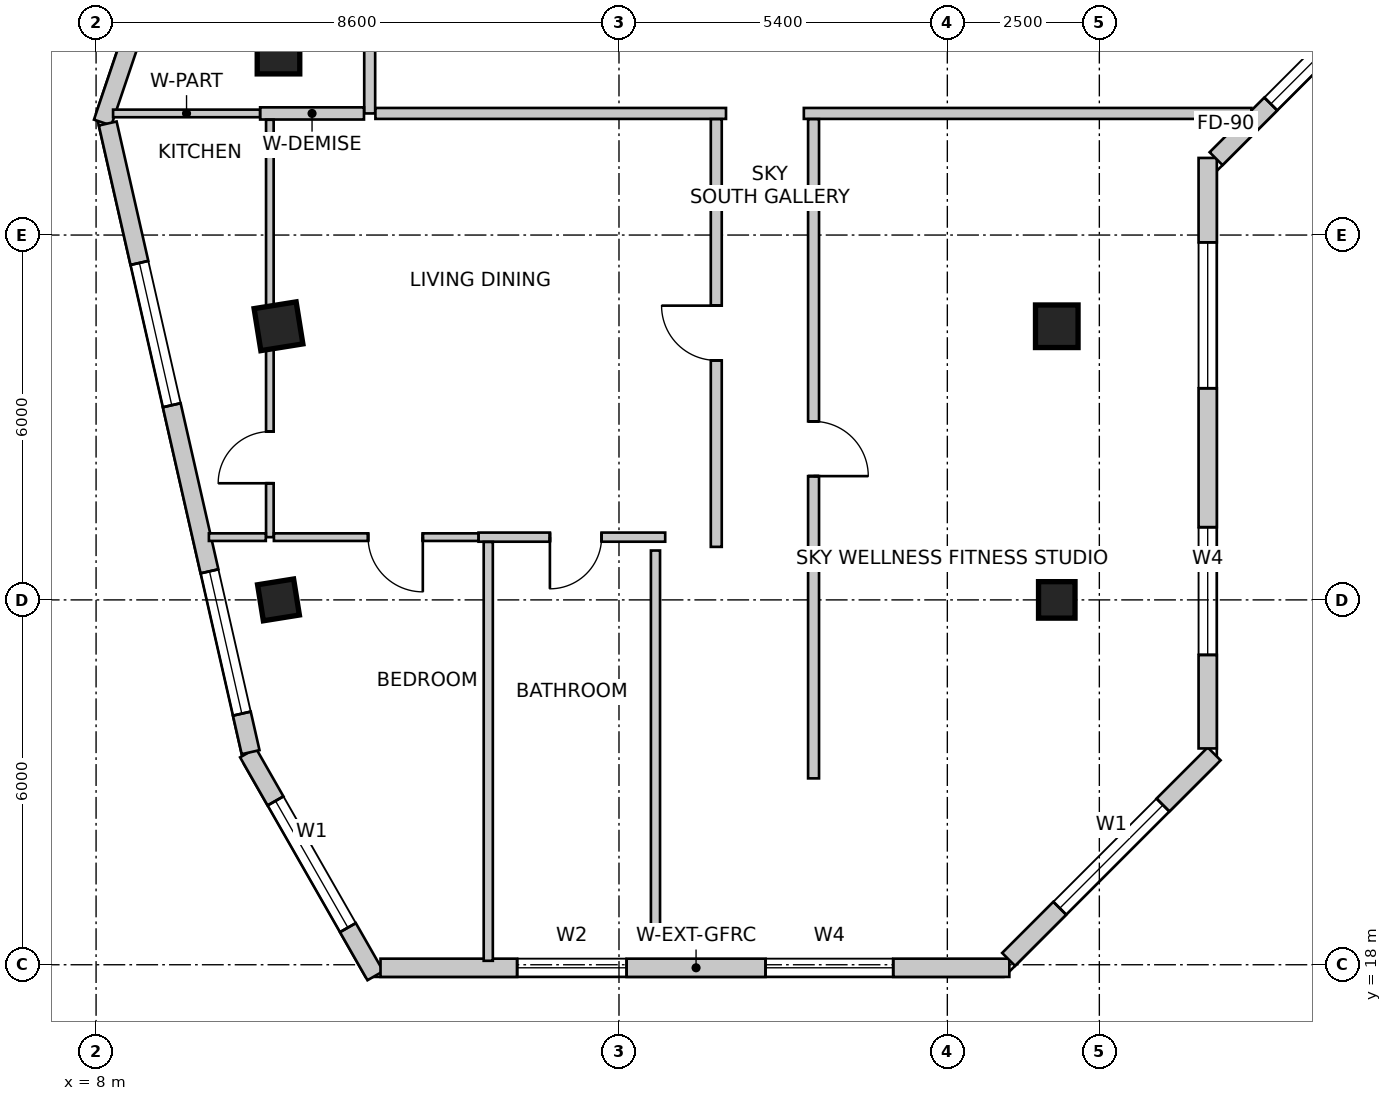
"""IFC4 building model, lengths in metres.
Left out: names, types, materials, properties, quantities, classifications, styles, units other than length and angle.
Written with IfcOpenShell. Run it as: python <this file> out.ifc"""

import sys

from ifc_helpers import new_model, si_unit, direction, frame, frame_2d, origin, origin_2d, place, context, subcontext, project, spatial, rectangle, extrude, source, transform, mapped, element, fill, save


model = new_model("IFC4")
c1 = context("Model", 3, precision=1e-05, world=origin(), true_north=direction((0.0, 1.0)))
c2 = subcontext(c1, "Body", "Model", "MODEL_VIEW")
j1 = project(units=[si_unit("LENGTHUNIT", "METRE"), si_unit("PLANEANGLEUNIT", "RADIAN")], contexts=[c1])
p1 = place(None, origin())
s1 = spatial("IfcSite", under=j1, at=p1, CompositionType="ELEMENT")
p2 = place(p1, origin())
s2 = spatial("IfcBuilding", under=s1, at=p2, CompositionType="ELEMENT")
p3 = place(p2, frame((0.0, 0.0, 263.7)))
s3 = spatial("IfcBuildingStorey", under=s2, at=p3, CompositionType="ELEMENT", Elevation=263.7)
m1 = source(origin(), c2, "Body", "SweptSolid", [
    extrude(rectangle(XDim=0.7, YDim=0.7, at=origin_2d()), origin(), (0.0, 0.0, 1.0), 3.6),
])
for number, where, z_axis, x_axis in (
    (1, (11.0, 33.0, 0.0), (0.0, 0.0, 1.0), (1.0, 0.0, 0.0)),
    (2, (11.0, 28.5, 0.0), (0.0, 0.0, 1.0), (0.158, -0.987, 0.0)),
):
    element("IfcColumn", number, at=place(p3, frame(where, z_axis=z_axis, x_axis=x_axis)), inside=s3, PredefinedType="COLUMN", context=c2, shape_type="MappedRepresentation", body=[
        mapped(m1, transform((0.0, 0.0, 0.0), scale=1.0)),
    ])
m2 = source(origin(), c2, "Body", "SweptSolid", [
    extrude(rectangle(XDim=0.6, YDim=0.6, at=origin_2d()), origin(), (0.0, 0.0, 1.0), 3.6),
])
p4 = place(p3, frame((11.0, 24.0, 0.0), z_axis=(0.0, 0.0, 1.0), x_axis=(0.158158067254, -0.987413806751, 0.0)))
e3 = element("IfcColumn", 3, at=p4, inside=s3, PredefinedType="COLUMN", context=c2, shape_type="MappedRepresentation", body=[
    mapped(m2, transform((0.0, 0.0, 0.0), scale=1.0)),
])
p5 = place(p3, frame((23.8, 28.5, 0.0), z_axis=(0.0, 0.0, 1.0), x_axis=(1.0, 0.0, 0.0)))
e4 = element("IfcColumn", 4, at=p5, inside=s3, PredefinedType="COLUMN", context=c2, shape_type="MappedRepresentation", body=[
    mapped(m1, transform((0.0, 0.0, 0.0), scale=1.0)),
])
p6 = place(p3, frame((23.8, 24.0, 0.0), z_axis=(0.0, 0.0, 1.0), x_axis=(1.0, 0.0, 0.0)))
e5 = element("IfcColumn", 5, at=p6, inside=s3, PredefinedType="COLUMN", context=c2, shape_type="MappedRepresentation", body=[
    mapped(m2, transform((0.0, 0.0, 0.0), scale=1.0)),
])
p7 = place(p3, frame((10.499, 21.485, 0.0), z_axis=(0.0, 0.0, 1.0), x_axis=(0.496163848656, -0.868228907194, 0.0)))
e6 = element("IfcWall", 6, at=p7, inside=s3, PredefinedType="SOLIDWALL", context=c2, shape_type="SweptSolid", body=[
    extrude(rectangle(XDim=4.222, YDim=0.3, at=frame_2d((2.111, 0.0))), origin(), (0.0, 0.0, 1.0), 3.35),
])
m3 = source(origin(), c2, "Body", "SweptSolid", [
    extrude(rectangle(XDim=2.4, YDim=2.2, at=frame_2d((1.2, 1.1))), frame((0.0, 0.16, 0.0), z_axis=(0.0, -1.0, 0.0), x_axis=(1.0, 0.0, 0.0)), (0.0, 0.0, 1.0), 0.32),
])
p8 = place(p7, frame((0.911, 0.0, 0.85)))
e7 = element("IfcOpeningElement", 7, at=p8, cuts=e6, PredefinedType="OPENING", context=c2, shape_type="MappedRepresentation", body=[
    mapped(m3, transform((0.0, 0.0, 0.0), scale=1.0)),
])
p9 = place(p3, frame((12.678, 17.95, 0.0), z_axis=(0.0, 0.0, 1.0), x_axis=(1.0, 0.0, 0.0)))
e8 = element("IfcWall", 8, at=p9, inside=s3, PredefinedType="SOLIDWALL", context=c2, shape_type="SweptSolid", body=[
    extrude(rectangle(XDim=10.342, YDim=0.3, at=frame_2d((5.171, 0.0))), origin(), (0.0, 0.0, 1.0), 3.35),
])
m4 = source(origin(), c2, "Body", "SweptSolid", [
    extrude(rectangle(XDim=1.8, YDim=2.1, at=frame_2d((0.9, 1.05))), frame((0.0, 0.16, 0.0), z_axis=(0.0, -1.0, 0.0), x_axis=(1.0, 0.0, 0.0)), (0.0, 0.0, 1.0), 0.32),
])
p10 = place(p9, frame((2.247, 0.0, 0.85)))
e9 = element("IfcOpeningElement", 9, at=p10, cuts=e8, PredefinedType="OPENING", context=c2, shape_type="MappedRepresentation", body=[
    mapped(m4, transform((0.0, 0.0, 0.0), scale=1.0)),
])
m5 = source(origin(), c2, "Body", "SweptSolid", [
    extrude(rectangle(XDim=2.1, YDim=2.0, at=frame_2d((1.05, 1.0))), frame((0.0, 0.16, 0.0), z_axis=(0.0, -1.0, 0.0), x_axis=(1.0, 0.0, 0.0)), (0.0, 0.0, 1.0), 0.32),
])
p11 = place(p9, frame((6.332, 0.0, 0.85)))
e10 = element("IfcOpeningElement", 10, at=p11, cuts=e8, PredefinedType="OPENING", context=c2, shape_type="MappedRepresentation", body=[
    mapped(m5, transform((0.0, 0.0, 0.0), scale=1.0)),
])
p12 = place(p3, frame((23.008, 18.088, 0.0), z_axis=(0.0, 0.0, 1.0), x_axis=(0.707106781187, 0.707106781187, 0.0)))
e11 = element("IfcWall", 11, at=p12, inside=s3, PredefinedType="SOLIDWALL", context=c2, shape_type="SweptSolid", body=[
    extrude(rectangle(XDim=4.781, YDim=0.3, at=frame_2d((2.39, 0.0))), origin(), (0.0, 0.0, 1.0), 3.35),
])
p13 = place(p12, frame((1.19, 0.0, 0.85)))
e12 = element("IfcOpeningElement", 12, at=p13, cuts=e11, PredefinedType="OPENING", context=c2, shape_type="MappedRepresentation", body=[
    mapped(m3, transform((0.0, 0.0, 0.0), scale=1.0)),
])
p14 = place(p3, frame((26.282, 21.557, 0.0), z_axis=(0.0, 0.0, 1.0), x_axis=(0.0, 1.0, 0.0)))
e13 = element("IfcWall", 13, at=p14, inside=s3, PredefinedType="SOLIDWALL", context=c2, shape_type="SweptSolid", body=[
    extrude(rectangle(XDim=9.711, YDim=0.3, at=frame_2d((4.855, 0.0))), origin(), (0.0, 0.0, 1.0), 3.35),
])
p15 = place(p14, frame((1.538, 0.0, 0.85)))
e14 = element("IfcOpeningElement", 14, at=p15, cuts=e13, PredefinedType="OPENING", context=c2, shape_type="MappedRepresentation", body=[
    mapped(m5, transform((0.0, 0.0, 0.0), scale=1.0)),
])
p16 = place(p14, frame((5.923, 0.0, 0.85)))
e15 = element("IfcOpeningElement", 15, at=p16, cuts=e13, PredefinedType="OPENING", context=c2, shape_type="MappedRepresentation", body=[
    mapped(m3, transform((0.0, 0.0, 0.0), scale=1.0)),
])
p17 = place(p3, frame((26.42, 31.256, 0.0), z_axis=(0.0, 0.0, 1.0), x_axis=(0.707106781187, 0.707106781187, 0.0)))
e16 = element("IfcWall", 16, at=p17, inside=s3, PredefinedType="SOLIDWALL", context=c2, shape_type="SweptSolid", body=[
    extrude(rectangle(XDim=2.907, YDim=0.3, at=frame_2d((1.454, 0.0))), origin(), (0.0, 0.0, 1.0), 3.35),
])
m6 = source(origin(), c2, "Body", "SweptSolid", [
    extrude(rectangle(XDim=1.2, YDim=1.6, at=frame_2d((0.6, 0.8))), frame((0.0, 0.16, 0.0), z_axis=(0.0, -1.0, 0.0), x_axis=(1.0, 0.0, 0.0)), (0.0, 0.0, 1.0), 0.32),
])
p18 = place(p17, frame((1.272, 0.0, 0.85)))
e17 = element("IfcOpeningElement", 17, at=p18, cuts=e16, PredefinedType="OPENING", context=c2, shape_type="MappedRepresentation", body=[
    mapped(m6, transform((0.0, 0.0, 0.0), scale=1.0)),
])
p19 = place(p3, frame((13.269, 47.134, 0.0), z_axis=(0.0, 0.0, 1.0), x_axis=(-0.3199211297, -0.947444178182, 0.0)))
e18 = element("IfcWall", 18, at=p19, inside=s3, PredefinedType="SOLIDWALL", context=c2, shape_type="SweptSolid", body=[
    extrude(rectangle(XDim=16.132, YDim=0.3, at=frame_2d((8.066, 0.0))), origin(), (0.0, 0.0, 1.0), 3.35),
])
p20 = place(p19, frame((2.585, 0.0, 0.85)))
e19 = element("IfcOpeningElement", 19, at=p20, cuts=e18, PredefinedType="OPENING", context=c2, shape_type="MappedRepresentation", body=[
    mapped(m5, transform((0.0, 0.0, 0.0), scale=1.0)),
])
p21 = place(p19, frame((7.267, 0.0, 0.85)))
e20 = element("IfcOpeningElement", 20, at=p21, cuts=e18, PredefinedType="OPENING", context=c2, shape_type="MappedRepresentation", body=[
    mapped(m3, transform((0.0, 0.0, 0.0), scale=1.0)),
])
p22 = place(p19, frame((12.249, 0.0, 0.85)))
e21 = element("IfcOpeningElement", 21, at=p22, cuts=e18, PredefinedType="OPENING", context=c2, shape_type="MappedRepresentation", body=[
    mapped(m5, transform((0.0, 0.0, 0.0), scale=1.0)),
])
p23 = place(p3, frame((8.191, 31.834, 0.0), z_axis=(0.0, 0.0, 1.0), x_axis=(0.221636032737, -0.975129462683, 0.0)))
e22 = element("IfcWall", 22, at=p23, inside=s3, PredefinedType="SOLIDWALL", context=c2, shape_type="SweptSolid", body=[
    extrude(rectangle(XDim=10.602, YDim=0.3, at=frame_2d((5.301, 0.0))), origin(), (0.0, 0.0, 1.0), 3.35),
])
p24 = place(p23, frame((2.351, 0.0, 0.85)))
e23 = element("IfcOpeningElement", 23, at=p24, cuts=e22, PredefinedType="OPENING", context=c2, shape_type="MappedRepresentation", body=[
    mapped(m3, transform((0.0, 0.0, 0.0), scale=1.0)),
])
p25 = place(p23, frame((7.552, 0.0, 0.85)))
e24 = element("IfcOpeningElement", 24, at=p25, cuts=e22, PredefinedType="OPENING", context=c2, shape_type="MappedRepresentation", body=[
    mapped(m3, transform((0.0, 0.0, 0.0), scale=1.0)),
])
p26 = place(p3, frame((12.5, 32.0, 0.0), z_axis=(0.0, 0.0, 1.0), x_axis=(0.0, 1.0, 0.0)))
e25 = element("IfcWall", 25, at=p26, inside=s3, PredefinedType="PARTITIONING", context=c2, shape_type="SweptSolid", body=[
    extrude(rectangle(XDim=1.556, YDim=0.18, at=frame_2d((0.778, 0.0))), origin(), (0.0, 0.0, 1.0), 3.019),
])
p27 = place(p3, frame((18.36, 32.0, 0.0), z_axis=(0.0, 0.0, 1.0), x_axis=(-1.0, 0.0, 0.0)))
e26 = element("IfcWall", 26, at=p27, inside=s3, PredefinedType="PARTITIONING", context=c2, shape_type="SweptSolid", body=[
    extrude(rectangle(XDim=5.766, YDim=0.18, at=frame_2d((2.883, 0.0))), origin(), (0.0, 0.0, 1.0), 3.019),
])
p28 = place(p3, frame((27.001, 32.0, 0.0), z_axis=(0.0, 0.0, 1.0), x_axis=(-1.0, 0.0, 0.0)))
e27 = element("IfcWall", 27, at=p28, inside=s3, PredefinedType="PARTITIONING", context=c2, shape_type="SweptSolid", body=[
    extrude(rectangle(XDim=7.361, YDim=0.18, at=frame_2d((3.681, 0.0))), origin(), (0.0, 0.0, 1.0), 3.019),
])
p29 = place(p3, frame((12.406, 32.0, 0.0), z_axis=(0.0, 0.0, 1.0), x_axis=(-1.0, 0.0, 0.0)))
e28 = element("IfcWall", 28, at=p29, inside=s3, PredefinedType="PARTITIONING", context=c2, shape_type="SweptSolid", body=[
    extrude(rectangle(XDim=1.708, YDim=0.2, at=frame_2d((0.854, 0.0))), origin(), (0.0, 0.0, 1.0), 2.642),
])
p30 = place(p3, frame((10.696, 32.0, 0.0), z_axis=(0.0, 0.0, 1.0), x_axis=(-1.0, 0.0, 0.0)))
e29 = element("IfcWall", 29, at=p30, inside=s3, PredefinedType="PARTITIONING", context=c2, shape_type="SweptSolid", body=[
    extrude(rectangle(XDim=2.416, YDim=0.125, at=frame_2d((1.208, 0.0))), origin(), (0.0, 0.0, 1.0), 3.35),
])
p31 = place(p3, frame((18.2, 24.872, 0.0), z_axis=(0.0, 0.0, 1.0), x_axis=(0.0, 1.0, 0.0)))
e30 = element("IfcWall", 30, at=p31, inside=s3, PredefinedType="PARTITIONING", context=c2, shape_type="SweptSolid", body=[
    extrude(rectangle(XDim=7.034, YDim=0.18, at=frame_2d((3.517, 0.0))), origin(), (0.0, 0.0, 1.0), 2.879),
])
m7 = source(origin(), c2, "Body", "SweptSolid", [
    extrude(rectangle(XDim=0.9, YDim=2.15, at=frame_2d((0.45, 1.075))), frame((0.0, 0.1, 0.0), z_axis=(0.0, -1.0, 0.0), x_axis=(1.0, 0.0, 0.0)), (0.0, 0.0, 1.0), 0.2),
])
p32 = place(p31, frame((3.067, 0.0, 0.0)))
e31 = element("IfcOpeningElement", 31, at=p32, cuts=e30, PredefinedType="OPENING", context=c2, shape_type="MappedRepresentation", body=[
    mapped(m7, transform((0.0, 0.0, 0.0), scale=1.0)),
])
p33 = place(p3, frame((19.8, 31.906, 0.0), z_axis=(0.0, 0.0, 1.0), x_axis=(0.0, -1.0, 0.0)))
e32 = element("IfcWall", 32, at=p33, inside=s3, PredefinedType="PARTITIONING", context=c2, shape_type="SweptSolid", body=[
    extrude(rectangle(XDim=10.841, YDim=0.18, at=frame_2d((5.42, 0.0))), origin(), (0.0, 0.0, 1.0), 2.879),
])
p34 = place(p33, frame((4.97, 0.0, 0.0)))
e33 = element("IfcOpeningElement", 33, at=p34, cuts=e32, PredefinedType="OPENING", context=c2, shape_type="MappedRepresentation", body=[
    mapped(m7, transform((0.0, 0.0, 0.0), scale=1.0)),
])
p35 = place(p3, frame((10.858, 25.032, 0.0), z_axis=(0.0, 0.0, 1.0), x_axis=(0.0, 1.0, 0.0)))
e34 = element("IfcWall", 34, at=p35, inside=s3, PredefinedType="PARTITIONING", context=c2, shape_type="SweptSolid", body=[
    extrude(rectangle(XDim=6.864, YDim=0.125, at=frame_2d((3.432, 0.0))), origin(), (0.0, 0.0, 1.0), 2.642),
])
m8 = source(origin(), c2, "Body", "SweptSolid", [
    extrude(rectangle(XDim=0.85, YDim=2.15, at=frame_2d((0.425, 1.075))), frame((0.0, 0.073, 0.0), z_axis=(0.0, -1.0, 0.0), x_axis=(1.0, 0.0, 0.0)), (0.0, 0.0, 1.0), 0.145),
])
p36 = place(p35, frame((0.886, 0.0, 0.0)))
e35 = element("IfcOpeningElement", 35, at=p36, cuts=e34, PredefinedType="OPENING", context=c2, shape_type="MappedRepresentation", body=[
    mapped(m8, transform((0.0, 0.0, 0.0), scale=1.0)),
])
p37 = place(p3, frame((17.36, 25.032, 0.0), z_axis=(0.0, 0.0, 1.0), x_axis=(-1.0, 0.0, 0.0)))
e36 = element("IfcWall", 36, at=p37, inside=s3, PredefinedType="PARTITIONING", context=c2, shape_type="SweptSolid", body=[
    extrude(rectangle(XDim=3.07, YDim=0.15, at=frame_2d((1.535, 0.0))), origin(), (0.0, 0.0, 1.0), 3.35),
])
m9 = source(origin(), c2, "Body", "SweptSolid", [
    extrude(rectangle(XDim=0.85, YDim=2.15, at=frame_2d((0.425, 1.075))), frame((0.0, 0.085, 0.0), z_axis=(0.0, -1.0, 0.0), x_axis=(1.0, 0.0, 0.0)), (0.0, 0.0, 1.0), 0.17),
])
p38 = place(p37, frame((1.046, 0.0, 0.0)))
e37 = element("IfcOpeningElement", 37, at=p38, cuts=e36, PredefinedType="OPENING", context=c2, shape_type="MappedRepresentation", body=[
    mapped(m9, transform((0.0, 0.0, 0.0), scale=1.0)),
])
p39 = place(p3, frame((14.288, 25.032, 0.0), z_axis=(0.0, 0.0, 1.0), x_axis=(-1.0, 0.0, 0.0)))
e38 = element("IfcWall", 38, at=p39, inside=s3, PredefinedType="PARTITIONING", context=c2, shape_type="SweptSolid", body=[
    extrude(rectangle(XDim=3.364, YDim=0.125, at=frame_2d((1.682, 0.0))), origin(), (0.0, 0.0, 1.0), 2.642),
])
m10 = source(origin(), c2, "Body", "SweptSolid", [
    extrude(rectangle(XDim=0.9, YDim=2.15, at=frame_2d((0.45, 1.075))), frame((0.0, 0.073, 0.0), z_axis=(0.0, -1.0, 0.0), x_axis=(1.0, 0.0, 0.0)), (0.0, 0.0, 1.0), 0.145),
])
p40 = place(p39, frame((0.915, 0.0, 0.0)))
e39 = element("IfcOpeningElement", 39, at=p40, cuts=e38, PredefinedType="OPENING", context=c2, shape_type="MappedRepresentation", body=[
    mapped(m10, transform((0.0, 0.0, 0.0), scale=1.0)),
])
p41 = place(p3, frame((10.792, 25.032, 0.0), z_axis=(0.0, 0.0, 1.0), x_axis=(-1.0, 0.0, 0.0)))
e40 = element("IfcWall", 40, at=p41, inside=s3, PredefinedType="PARTITIONING", context=c2, shape_type="SweptSolid", body=[
    extrude(rectangle(XDim=0.936, YDim=0.125, at=frame_2d((0.468, 0.0))), origin(), (0.0, 0.0, 1.0), 3.35),
])
p42 = place(p3, frame((14.45, 18.065, 0.0), z_axis=(0.0, 0.0, 1.0), x_axis=(0.0, 1.0, 0.0)))
e41 = element("IfcWall", 41, at=p42, inside=s3, PredefinedType="PARTITIONING", context=c2, shape_type="SweptSolid", body=[
    extrude(rectangle(XDim=6.888, YDim=0.15, at=frame_2d((3.444, 0.0))), origin(), (0.0, 0.0, 1.0), 2.979),
])
p43 = place(p3, frame((17.2, 24.812, 0.0), z_axis=(0.0, 0.0, 1.0), x_axis=(0.0, -1.0, 0.0)))
e42 = element("IfcWall", 42, at=p43, inside=s3, PredefinedType="PARTITIONING", context=c2, shape_type="SweptSolid", body=[
    extrude(rectangle(XDim=6.527, YDim=0.15, at=frame_2d((3.264, 0.0))), origin(), (0.0, 0.0, 1.0), 2.979),
])
m11 = source(origin(), c2, "Body", "SweptSolid", [
    extrude(rectangle(XDim=2.4, YDim=2.2, at=frame_2d((1.2, 1.1))), frame((0.0, -0.015, 0.0), z_axis=(0.0, -1.0, 0.0), x_axis=(1.0, 0.0, 0.0)), (0.0, 0.0, 1.0), 0.06),
])
p44 = place(p8, origin())
e43 = element("IfcWindow", 43, at=p44, inside=s3, PartitioningType="SINGLE_PANEL", PredefinedType="WINDOW", context=c2, shape_type="MappedRepresentation", body=[
    mapped(m11, transform((0.0, 0.0, 0.0), scale=1.0)),
])
fill(e7, e43)
m12 = source(origin(), c2, "Body", "SweptSolid", [
    extrude(rectangle(XDim=1.8, YDim=2.1, at=frame_2d((0.9, 1.05))), frame((0.0, -0.015, 0.0), z_axis=(0.0, -1.0, 0.0), x_axis=(1.0, 0.0, 0.0)), (0.0, 0.0, 1.0), 0.06),
])
p45 = place(p10, origin())
e44 = element("IfcWindow", 44, at=p45, inside=s3, PartitioningType="SINGLE_PANEL", PredefinedType="WINDOW", context=c2, shape_type="MappedRepresentation", body=[
    mapped(m12, transform((0.0, 0.0, 0.0), scale=1.0)),
])
fill(e9, e44)
m13 = source(origin(), c2, "Body", "SweptSolid", [
    extrude(rectangle(XDim=2.1, YDim=2.0, at=frame_2d((1.05, 1.0))), frame((0.0, -0.015, 0.0), z_axis=(0.0, -1.0, 0.0), x_axis=(1.0, 0.0, 0.0)), (0.0, 0.0, 1.0), 0.06),
])
p46 = place(p11, origin())
e45 = element("IfcWindow", 45, at=p46, inside=s3, PartitioningType="SINGLE_PANEL", PredefinedType="WINDOW", context=c2, shape_type="MappedRepresentation", body=[
    mapped(m13, transform((0.0, 0.0, 0.0), scale=1.0)),
])
fill(e10, e45)
p47 = place(p13, origin())
e46 = element("IfcWindow", 46, at=p47, inside=s3, PartitioningType="SINGLE_PANEL", PredefinedType="WINDOW", context=c2, shape_type="MappedRepresentation", body=[
    mapped(m11, transform((0.0, 0.0, 0.0), scale=1.0)),
])
fill(e12, e46)
p48 = place(p15, origin())
e47 = element("IfcWindow", 47, at=p48, inside=s3, PartitioningType="SINGLE_PANEL", PredefinedType="WINDOW", context=c2, shape_type="MappedRepresentation", body=[
    mapped(m13, transform((0.0, 0.0, 0.0), scale=1.0)),
])
fill(e14, e47)
p49 = place(p16, origin())
e48 = element("IfcWindow", 48, at=p49, inside=s3, PartitioningType="SINGLE_PANEL", PredefinedType="WINDOW", context=c2, shape_type="MappedRepresentation", body=[
    mapped(m11, transform((0.0, 0.0, 0.0), scale=1.0)),
])
fill(e15, e48)
m14 = source(origin(), c2, "Body", "SweptSolid", [
    extrude(rectangle(XDim=1.2, YDim=1.6, at=frame_2d((0.6, 0.8))), frame((0.0, -0.015, 0.0), z_axis=(0.0, -1.0, 0.0), x_axis=(1.0, 0.0, 0.0)), (0.0, 0.0, 1.0), 0.06),
])
p50 = place(p18, origin())
e49 = element("IfcWindow", 49, at=p50, inside=s3, PartitioningType="SINGLE_PANEL", PredefinedType="WINDOW", context=c2, shape_type="MappedRepresentation", body=[
    mapped(m14, transform((0.0, 0.0, 0.0), scale=1.0)),
])
fill(e17, e49)
p51 = place(p24, origin())
e50 = element("IfcWindow", 50, at=p51, inside=s3, PartitioningType="SINGLE_PANEL", PredefinedType="WINDOW", context=c2, shape_type="MappedRepresentation", body=[
    mapped(m11, transform((0.0, 0.0, 0.0), scale=1.0)),
])
fill(e23, e50)
p52 = place(p25, origin())
e51 = element("IfcWindow", 51, at=p52, inside=s3, PartitioningType="SINGLE_PANEL", PredefinedType="WINDOW", context=c2, shape_type="MappedRepresentation", body=[
    mapped(m11, transform((0.0, 0.0, 0.0), scale=1.0)),
])
fill(e24, e51)
m15 = source(origin(), c2, "Body", "SweptSolid", [
    extrude(rectangle(XDim=0.9, YDim=2.15, at=frame_2d((0.45, 1.075))), frame((0.0, 0.025, 0.0), z_axis=(0.0, -1.0, 0.0), x_axis=(1.0, 0.0, 0.0)), (0.0, 0.0, 1.0), 0.05),
])
p53 = place(p32, origin())
e52 = element("IfcDoor", 52, at=p53, inside=s3, OperationType="SINGLE_SWING_RIGHT", PredefinedType="DOOR", context=c2, shape_type="MappedRepresentation", body=[
    mapped(m15, transform((0.0, 0.0, 0.0), scale=1.0)),
])
fill(e31, e52)
m16 = source(origin(), c2, "Body", "SweptSolid", [
    extrude(rectangle(XDim=0.85, YDim=2.15, at=frame_2d((0.425, 1.075))), frame((0.0, 0.025, 0.0), z_axis=(0.0, -1.0, 0.0), x_axis=(1.0, 0.0, 0.0)), (0.0, 0.0, 1.0), 0.05),
])
p54 = place(p36, origin())
e53 = element("IfcDoor", 53, at=p54, inside=s3, OperationType="SINGLE_SWING_LEFT", PredefinedType="DOOR", context=c2, shape_type="MappedRepresentation", body=[
    mapped(m16, transform((0.0, 0.0, 0.0), scale=1.0)),
])
fill(e35, e53)
p55 = place(p38, origin())
e54 = element("IfcDoor", 54, at=p55, inside=s3, OperationType="SINGLE_SWING_RIGHT", PredefinedType="DOOR", context=c2, shape_type="MappedRepresentation", body=[
    mapped(m16, transform((0.0, 0.0, 0.0), scale=1.0)),
])
fill(e37, e54)
m17 = source(origin(), c2, "Body", "SweptSolid", [
    extrude(rectangle(XDim=0.9, YDim=2.15, at=frame_2d((0.45, 1.075))), frame((0.0, 0.025, 0.0), z_axis=(0.0, -1.0, 0.0), x_axis=(1.0, 0.0, 0.0)), (0.0, 0.0, 1.0), 0.05),
])
p56 = place(p40, origin())
e55 = element("IfcDoor", 55, at=p56, inside=s3, OperationType="SINGLE_SWING_LEFT", PredefinedType="DOOR", context=c2, shape_type="MappedRepresentation", body=[
    mapped(m17, transform((0.0, 0.0, 0.0), scale=1.0)),
])
fill(e39, e55)
p57 = place(p34, origin())
e56 = element("IfcDoor", 56, at=p57, inside=s3, OperationType="SINGLE_SWING_RIGHT", PredefinedType="DOOR", context=c2, shape_type="MappedRepresentation", body=[
    mapped(m17, transform((0.0, 0.0, 0.0), scale=1.0)),
])
fill(e33, e56)
save(model, sys.argv[1])
